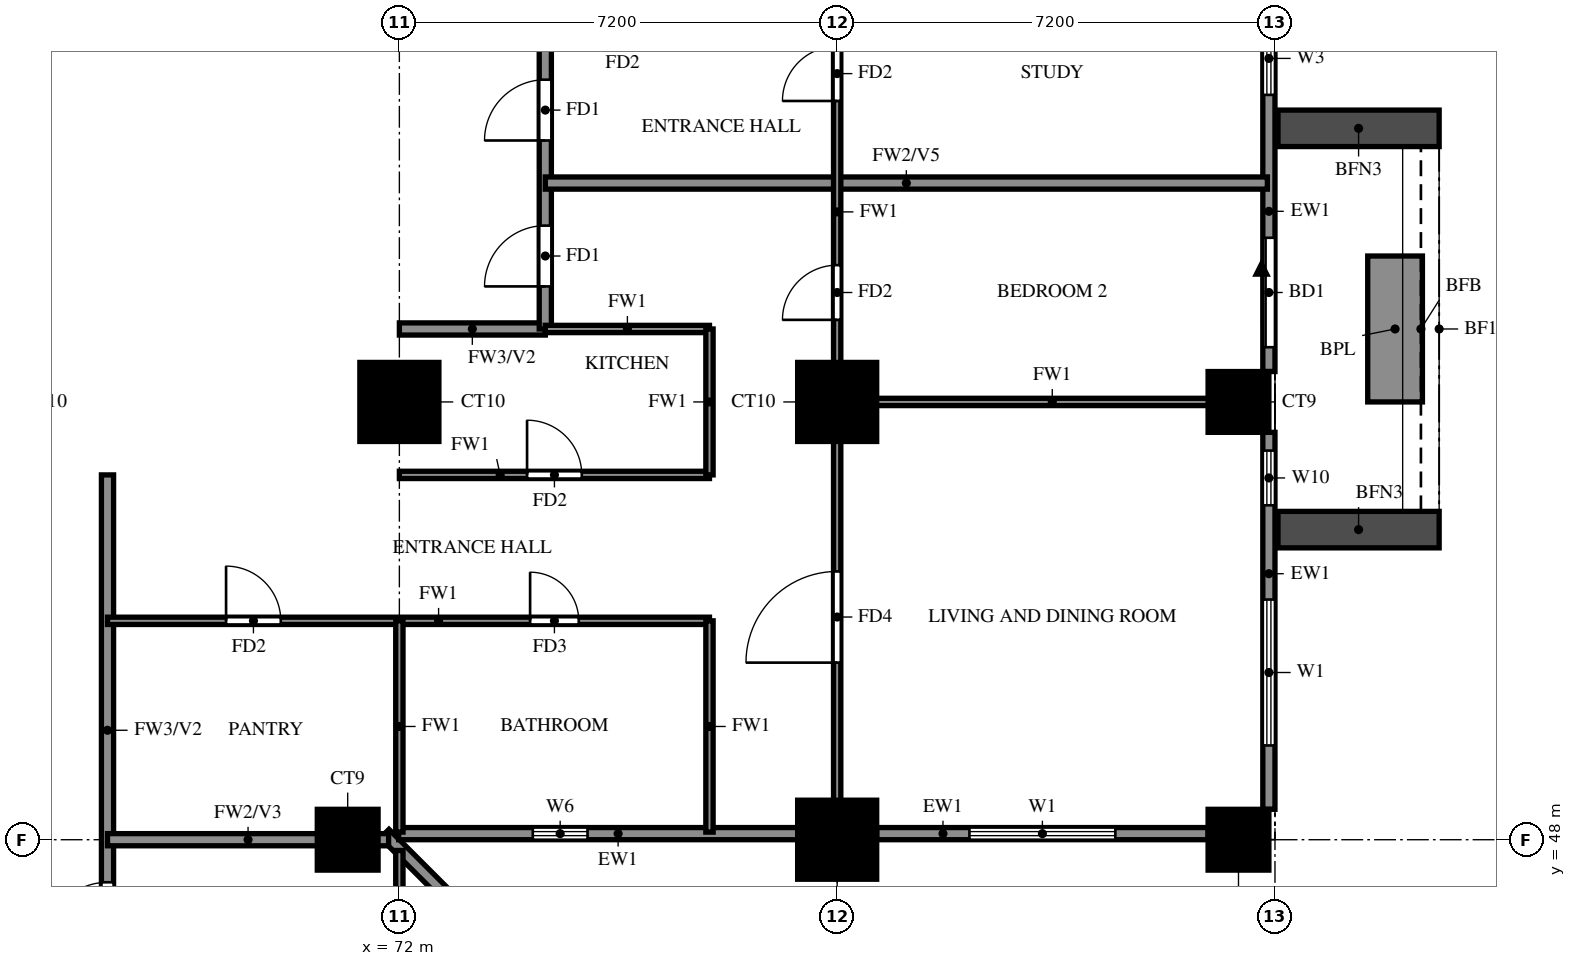
"""IFC4 building model, lengths in metres.
Left out: names, types, materials, properties, quantities, classifications, styles, units other than length and angle.
Written with IfcOpenShell. Run it as: python <this file> out.ifc"""

import sys

from ifc_helpers import new_model, si_unit, direction, frame, frame_2d, origin, origin_2d, place, context, subcontext, project, spatial, rectangle, extrude, source, transform, mapped, element, fill, save


model = new_model("IFC4")
c1 = context("Model", 3, precision=1e-05, world=origin(), true_north=direction((0.0, 1.0)))
c2 = subcontext(c1, "Body", "Model", "MODEL_VIEW")
j1 = project(units=[si_unit("LENGTHUNIT", "METRE"), si_unit("PLANEANGLEUNIT", "RADIAN")], contexts=[c1])
p1 = place(None, origin())
s1 = spatial("IfcSite", under=j1, at=p1, CompositionType="ELEMENT")
p2 = place(p1, origin())
s2 = spatial("IfcBuilding", under=s1, at=p2, CompositionType="ELEMENT")
p3 = place(p2, frame((0.0, 0.0, 90.0)))
s3 = spatial("IfcBuildingStorey", under=s2, at=p3, CompositionType="ELEMENT", Elevation=90.0)
m1 = source(origin(), c2, "Body", "SweptSolid", [
    extrude(rectangle(XDim=1.0, YDim=1.0, at=origin_2d()), origin(), (0.0, 0.0, 1.0), 3.18),
])
p4 = place(p3, frame((71.15, 48.0, 0.0), z_axis=(0.0, 0.0, 1.0), x_axis=(1.0, 0.0, 0.0)))
e1 = element("IfcColumn", 1, at=p4, inside=s3, PredefinedType="COLUMN", context=c2, shape_type="MappedRepresentation", body=[
    mapped(m1, transform((0.0, 0.0, 0.0))),
])
m2 = source(origin(), c2, "Body", "SweptSolid", [
    extrude(rectangle(XDim=1.3, YDim=1.3, at=origin_2d()), origin(), (0.0, 0.0, 1.0), 3.18),
])
p5 = place(p3, frame((79.2, 48.0, 0.0), z_axis=(0.0, 0.0, 1.0), x_axis=(1.0, 0.0, 0.0)))
e2 = element("IfcColumn", 2, at=p5, inside=s3, PredefinedType="COLUMN", context=c2, shape_type="MappedRepresentation", body=[
    mapped(m2, transform((0.0, 0.0, 0.0))),
])
p6 = place(p3, frame((85.8, 48.0, 0.0), z_axis=(0.0, 0.0, 1.0), x_axis=(1.0, 0.0, 0.0)))
e3 = element("IfcColumn", 3, at=p6, inside=s3, PredefinedType="COLUMN", context=c2, shape_type="MappedRepresentation", body=[
    mapped(m1, transform((0.0, 0.0, 0.0))),
])
for number, where, z_axis, x_axis in (
    (4, (72.0, 55.2, 0.0), (0.0, 0.0, 1.0), (1.0, 0.0, 0.0)),
    (5, (79.2, 55.2, 0.0), (0.0, 0.0, 1.0), (1.0, 0.0, 0.0)),
):
    element("IfcColumn", number, at=place(p3, frame(where, z_axis=z_axis, x_axis=x_axis)), inside=s3, PredefinedType="COLUMN", context=c2, shape_type="MappedRepresentation", body=[
        mapped(m2, transform((0.0, 0.0, 0.0))),
    ])
p7 = place(p3, frame((85.8, 55.2, 0.0), z_axis=(0.0, 0.0, 1.0), x_axis=(1.0, 0.0, 0.0)))
e6 = element("IfcColumn", 6, at=p7, inside=s3, PredefinedType="COLUMN", context=c2, shape_type="MappedRepresentation", body=[
    mapped(m1, transform((0.0, 0.0, 0.0))),
])
p8 = place(p3, frame((85.996, 33.863, 0.0), z_axis=(0.0, 0.0, 1.0), x_axis=(-0.707100718496, 0.707112843825, 0.0)))
e7 = element("IfcWall", 7, at=p8, inside=s3, PredefinedType="SOLIDWALL", context=c2, shape_type="SweptSolid", body=[
    extrude(rectangle(XDim=20.135, YDim=0.2, at=frame_2d((10.067, 0.0))), origin(), (0.0, 0.0, 1.0), 3.18),
])
p9 = place(p3, frame((71.989, 48.1, 0.0), z_axis=(0.0, 0.0, 1.0), x_axis=(1.0, 0.0, 0.0)))
e8 = element("IfcWall", 8, at=p9, inside=s3, PredefinedType="SOLIDWALL", context=c2, shape_type="SweptSolid", body=[
    extrude(rectangle(XDim=6.562, YDim=0.2, at=frame_2d((3.281, 0.0))), origin(), (0.0, 0.0, 1.0), 3.18),
])
p10 = place(p9, frame((2.206, 0.0, 1.5)))
e9 = element("IfcOpeningElement", 9, at=p10, cuts=e8, PredefinedType="OPENING", context=c2, shape_type="SweptSolid", body=[
    extrude(rectangle(XDim=0.9, YDim=0.9, at=frame_2d((0.45, 0.45))), frame((0.0, 0.11, 0.0), z_axis=(0.0, -1.0, 0.0), x_axis=(1.0, 0.0, 0.0)), (0.0, 0.0, 1.0), 0.22),
])
p11 = place(p3, frame((79.85, 48.1, 0.0), z_axis=(0.0, 0.0, 1.0), x_axis=(1.0, 0.0, 0.0)))
e10 = element("IfcWall", 10, at=p11, inside=s3, PredefinedType="SOLIDWALL", context=c2, shape_type="SweptSolid", body=[
    extrude(rectangle(XDim=5.45, YDim=0.2, at=frame_2d((2.725, 0.0))), origin(), (0.0, 0.0, 1.0), 3.18),
])
p12 = place(p11, frame((1.525, 0.0, 0.6)))
e11 = element("IfcOpeningElement", 11, at=p12, cuts=e10, PredefinedType="OPENING", context=c2, shape_type="SweptSolid", body=[
    extrude(rectangle(XDim=2.4, YDim=2.4, at=frame_2d((1.2, 1.2))), frame((0.0, 0.11, 0.0), z_axis=(0.0, -1.0, 0.0), x_axis=(1.0, 0.0, 0.0)), (0.0, 0.0, 1.0), 0.22),
])
p13 = place(p3, frame((86.3, 48.5, 0.0), z_axis=(0.0, 0.0, 1.0), x_axis=(0.0, 1.0, 0.0)))
e12 = element("IfcWall", 12, at=p13, inside=s3, PredefinedType="SOLIDWALL", context=c2, shape_type="SweptSolid", body=[
    extrude(rectangle(XDim=6.2, YDim=0.2, at=frame_2d((3.1, 0.0))), origin(), (0.0, 0.0, 1.0), 3.18),
])
p14 = place(p13, frame((1.05, 0.0, 0.6)))
e13 = element("IfcOpeningElement", 13, at=p14, cuts=e12, PredefinedType="OPENING", context=c2, shape_type="SweptSolid", body=[
    extrude(rectangle(XDim=2.4, YDim=2.4, at=frame_2d((1.2, 1.2))), frame((0.0, 0.11, 0.0), z_axis=(0.0, -1.0, 0.0), x_axis=(1.0, 0.0, 0.0)), (0.0, 0.0, 1.0), 0.22),
])
p15 = place(p13, frame((5.0, 0.0, 0.6)))
e14 = element("IfcOpeningElement", 14, at=p15, cuts=e12, PredefinedType="OPENING", context=c2, shape_type="SweptSolid", body=[
    extrude(rectangle(XDim=0.9, YDim=2.4, at=frame_2d((0.45, 1.2))), frame((0.0, 0.11, 0.0), z_axis=(0.0, -1.0, 0.0), x_axis=(1.0, 0.0, 0.0)), (0.0, 0.0, 1.0), 0.22),
])
p16 = place(p3, frame((86.3, 55.7, 0.0), z_axis=(0.0, 0.0, 1.0), x_axis=(0.0, 1.0, 0.0)))
e15 = element("IfcWall", 15, at=p16, inside=s3, PredefinedType="SOLIDWALL", context=c2, shape_type="SweptSolid", body=[
    extrude(rectangle(XDim=6.2, YDim=0.2, at=frame_2d((3.1, 0.0))), origin(), (0.0, 0.0, 1.0), 3.18),
])
p17 = place(p16, frame((0.4, 0.0, 0.0)))
e16 = element("IfcOpeningElement", 16, at=p17, cuts=e15, PredefinedType="OPENING", context=c2, shape_type="SweptSolid", body=[
    extrude(rectangle(XDim=1.8, YDim=2.4, at=frame_2d((0.9, 1.2))), frame((0.0, 0.11, 0.0), z_axis=(0.0, -1.0, 0.0), x_axis=(1.0, 0.0, 0.0)), (0.0, 0.0, 1.0), 0.22),
])
p18 = place(p16, frame((4.55, 0.0, 0.6)))
e17 = element("IfcOpeningElement", 17, at=p18, cuts=e15, PredefinedType="OPENING", context=c2, shape_type="SweptSolid", body=[
    extrude(rectangle(XDim=1.2, YDim=2.4, at=frame_2d((0.6, 1.2))), frame((0.0, 0.11, 0.0), z_axis=(0.0, -1.0, 0.0), x_axis=(1.0, 0.0, 0.0)), (0.0, 0.0, 1.0), 0.22),
])
for number, where, z_axis, x_axis in (
    (18, (86.45, 53.1, 0.0), (0.0, 0.0, 1.0), (1.0, 0.0, 0.0)),
    (19, (86.45, 59.7, 0.0), (0.0, 0.0, 1.0), (1.0, 0.0, 0.0)),
):
    element("IfcWall", number, at=place(p3, frame(where, z_axis=z_axis, x_axis=x_axis)), inside=s3, PredefinedType="SOLIDWALL", context=c2, shape_type="SweptSolid", body=[
        extrude(rectangle(XDim=2.65, YDim=0.6, at=frame_2d((1.325, 0.0))), origin(), (0.0, 0.0, 1.0), 2.85),
    ])
p19 = place(p3, frame((88.375, 55.2, 0.0), z_axis=(0.0, 0.0, 1.0), x_axis=(0.0, 1.0, 0.0)))
e20 = element("IfcWall", 20, at=p19, inside=s3, PredefinedType="SOLIDWALL", context=c2, shape_type="SweptSolid", body=[
    extrude(rectangle(XDim=2.4, YDim=0.9, at=frame_2d((1.2, 0.0))), origin(), (0.0, 0.0, 1.0), 0.9),
])
p20 = place(p3, frame((72.0, 56.4, 0.0), z_axis=(0.0, 0.0, 1.0), x_axis=(1.0, 0.0, 0.0)))
e21 = element("IfcWall", 21, at=p20, inside=s3, PredefinedType="SOLIDWALL", context=c2, shape_type="SweptSolid", body=[
    extrude(rectangle(XDim=2.4, YDim=0.2, at=frame_2d((1.2, 0.0))), origin(), (0.0, 0.0, 1.0), 3.18),
])
p21 = place(p3, frame((67.2, 45.6, 0.0), z_axis=(0.0, 0.0, 1.0), x_axis=(0.0, 1.0, 0.0)))
e22 = element("IfcWall", 22, at=p21, inside=s3, PredefinedType="SOLIDWALL", context=c2, shape_type="SweptSolid", body=[
    extrude(rectangle(XDim=8.4, YDim=0.2, at=frame_2d((4.2, 0.0))), origin(), (0.0, 0.0, 1.0), 3.18),
])
p22 = place(p21, frame((0.7, 0.0, 0.0)))
e23 = element("IfcOpeningElement", 23, at=p22, cuts=e22, PredefinedType="OPENING", context=c2, shape_type="SweptSolid", body=[
    extrude(rectangle(XDim=1.0, YDim=2.1, at=frame_2d((0.5, 1.05))), frame((0.0, 0.11, 0.0), z_axis=(0.0, -1.0, 0.0), x_axis=(1.0, 0.0, 0.0)), (0.0, 0.0, 1.0), 0.22),
])
p23 = place(p3, frame((74.4, 56.4, 0.0), z_axis=(0.0, 0.0, 1.0), x_axis=(0.0, 1.0, 0.0)))
e24 = element("IfcWall", 24, at=p23, inside=s3, PredefinedType="SOLIDWALL", context=c2, shape_type="SweptSolid", body=[
    extrude(rectangle(XDim=9.6, YDim=0.2, at=frame_2d((4.8, 0.0))), origin(), (0.0, 0.0, 1.0), 3.18),
])
p24 = place(p23, frame((0.7, 0.0, 0.0)))
e25 = element("IfcOpeningElement", 25, at=p24, cuts=e24, PredefinedType="OPENING", context=c2, shape_type="SweptSolid", body=[
    extrude(rectangle(XDim=1.0, YDim=2.1, at=frame_2d((0.5, 1.05))), frame((0.0, 0.11, 0.0), z_axis=(0.0, -1.0, 0.0), x_axis=(1.0, 0.0, 0.0)), (0.0, 0.0, 1.0), 0.22),
])
p25 = place(p23, frame((3.1, 0.0, 0.0)))
e26 = element("IfcOpeningElement", 26, at=p25, cuts=e24, PredefinedType="OPENING", context=c2, shape_type="SweptSolid", body=[
    extrude(rectangle(XDim=1.0, YDim=2.1, at=frame_2d((0.5, 1.05))), frame((0.0, 0.11, 0.0), z_axis=(0.0, -1.0, 0.0), x_axis=(1.0, 0.0, 0.0)), (0.0, 0.0, 1.0), 0.22),
])
p26 = place(p3, frame((67.2, 48.0, 0.0), z_axis=(0.0, 0.0, 1.0), x_axis=(1.0, 0.0, 0.0)))
e27 = element("IfcWall", 27, at=p26, inside=s3, PredefinedType="SOLIDWALL", context=c2, shape_type="SweptSolid", body=[
    extrude(rectangle(XDim=4.623, YDim=0.2, at=frame_2d((2.312, 0.0))), origin(), (0.0, 0.0, 1.0), 3.18),
])
p27 = place(p3, frame((74.4, 58.8, 0.0), z_axis=(0.0, 0.0, 1.0), x_axis=(1.0, 0.0, 0.0)))
e28 = element("IfcWall", 28, at=p27, inside=s3, PredefinedType="SOLIDWALL", context=c2, shape_type="SweptSolid", body=[
    extrude(rectangle(XDim=11.875, YDim=0.2, at=frame_2d((5.938, 0.0))), origin(), (0.0, 0.0, 1.0), 2.28),
])
p28 = place(p3, frame((67.2, 51.6, 0.0), z_axis=(0.0, 0.0, 1.0), x_axis=(1.0, 0.0, 0.0)))
e29 = element("IfcWall", 29, at=p28, inside=s3, PredefinedType="PARTITIONING", context=c2, shape_type="SweptSolid", body=[
    extrude(rectangle(XDim=9.9, YDim=0.12, at=frame_2d((4.95, 0.0))), origin(), (0.0, 0.0, 1.0), 3.18),
])
p29 = place(p28, frame((6.95, 0.0, 0.0)))
e30 = element("IfcOpeningElement", 30, at=p29, cuts=e29, PredefinedType="OPENING", context=c2, shape_type="SweptSolid", body=[
    extrude(rectangle(XDim=0.8, YDim=2.1, at=frame_2d((0.4, 1.05))), frame((0.0, 0.07, 0.0), z_axis=(0.0, -1.0, 0.0), x_axis=(1.0, 0.0, 0.0)), (0.0, 0.0, 1.0), 0.14),
])
p30 = place(p28, frame((1.95, 0.0, 0.0)))
e31 = element("IfcOpeningElement", 31, at=p30, cuts=e29, PredefinedType="OPENING", context=c2, shape_type="SweptSolid", body=[
    extrude(rectangle(XDim=0.9, YDim=2.1, at=frame_2d((0.45, 1.05))), frame((0.0, 0.07, 0.0), z_axis=(0.0, -1.0, 0.0), x_axis=(1.0, 0.0, 0.0)), (0.0, 0.0, 1.0), 0.14),
])
p31 = place(p3, frame((72.0, 54.0, 0.0), z_axis=(0.0, 0.0, 1.0), x_axis=(1.0, 0.0, 0.0)))
e32 = element("IfcWall", 32, at=p31, inside=s3, PredefinedType="PARTITIONING", context=c2, shape_type="SweptSolid", body=[
    extrude(rectangle(XDim=5.1, YDim=0.12, at=frame_2d((2.55, 0.0))), origin(), (0.0, 0.0, 1.0), 3.18),
])
p32 = place(p31, frame((2.1, 0.0, 0.0)))
e33 = element("IfcOpeningElement", 33, at=p32, cuts=e32, PredefinedType="OPENING", context=c2, shape_type="SweptSolid", body=[
    extrude(rectangle(XDim=0.9, YDim=2.1, at=frame_2d((0.45, 1.05))), frame((0.0, 0.07, 0.0), z_axis=(0.0, -1.0, 0.0), x_axis=(1.0, 0.0, 0.0)), (0.0, 0.0, 1.0), 0.14),
])
p33 = place(p3, frame((79.2, 55.2, 0.0), z_axis=(0.0, 0.0, 1.0), x_axis=(1.0, 0.0, 0.0)))
e34 = element("IfcWall", 34, at=p33, inside=s3, PredefinedType="PARTITIONING", context=c2, shape_type="SweptSolid", body=[
    extrude(rectangle(XDim=7.075, YDim=0.12, at=frame_2d((3.538, 0.0))), origin(), (0.0, 0.0, 1.0), 3.18),
])
p34 = place(p3, frame((74.4, 56.4, 0.0), z_axis=(0.0, 0.0, 1.0), x_axis=(1.0, 0.0, 0.0)))
e35 = element("IfcWall", 35, at=p34, inside=s3, PredefinedType="PARTITIONING", context=c2, shape_type="SweptSolid", body=[
    extrude(rectangle(XDim=2.7, YDim=0.12, at=frame_2d((1.35, 0.0))), origin(), (0.0, 0.0, 1.0), 3.18),
])
p35 = place(p3, frame((72.0, 33.725, 0.0), z_axis=(0.0, 0.0, 1.0), x_axis=(0.0, 1.0, 0.0)))
e36 = element("IfcWall", 36, at=p35, inside=s3, PredefinedType="PARTITIONING", context=c2, shape_type="SweptSolid", body=[
    extrude(rectangle(XDim=14.098, YDim=0.12, at=frame_2d((7.049, 0.0))), origin(), (0.0, 0.0, 1.0), 2.28),
])
p36 = place(p35, frame((10.075, 0.0, 0.0)))
e37 = element("IfcOpeningElement", 37, at=p36, cuts=e36, PredefinedType="OPENING", context=c2, shape_type="SweptSolid", body=[
    extrude(rectangle(XDim=0.9, YDim=2.1, at=frame_2d((0.45, 1.05))), frame((0.0, 0.07, 0.0), z_axis=(0.0, -1.0, 0.0), x_axis=(1.0, 0.0, 0.0)), (0.0, 0.0, 1.0), 0.14),
])
for number, where, z_axis, x_axis in (
    (38, (72.0, 48.125, 0.0), (0.0, 0.0, 1.0), (0.0, 1.0, 0.0)),
    (39, (77.1, 48.125, 0.0), (0.0, 0.0, 1.0), (0.0, 1.0, 0.0)),
):
    element("IfcWall", number, at=place(p3, frame(where, z_axis=z_axis, x_axis=x_axis)), inside=s3, PredefinedType="PARTITIONING", context=c2, shape_type="SweptSolid", body=[
        extrude(rectangle(XDim=3.475, YDim=0.12, at=frame_2d((1.738, 0.0))), origin(), (0.0, 0.0, 1.0), 3.18),
    ])
p37 = place(p3, frame((77.1, 54.0, 0.0), z_axis=(0.0, 0.0, 1.0), x_axis=(0.0, 1.0, 0.0)))
e40 = element("IfcWall", 40, at=p37, inside=s3, PredefinedType="PARTITIONING", context=c2, shape_type="SweptSolid", body=[
    extrude(rectangle(XDim=2.4, YDim=0.12, at=frame_2d((1.2, 0.0))), origin(), (0.0, 0.0, 1.0), 3.18),
])
p38 = place(p3, frame((79.2, 48.125, 0.0), z_axis=(0.0, 0.0, 1.0), x_axis=(0.0, 1.0, 0.0)))
e41 = element("IfcWall", 41, at=p38, inside=s3, PredefinedType="PARTITIONING", context=c2, shape_type="SweptSolid", body=[
    extrude(rectangle(XDim=21.475, YDim=0.12, at=frame_2d((10.738, 0.0))), origin(), (0.0, 0.0, 1.0), 3.18),
])
p39 = place(p38, frame((2.788, 0.0, 0.0)))
e42 = element("IfcOpeningElement", 42, at=p39, cuts=e41, PredefinedType="OPENING", context=c2, shape_type="SweptSolid", body=[
    extrude(rectangle(XDim=1.5, YDim=2.1, at=frame_2d((0.75, 1.05))), frame((0.0, 0.07, 0.0), z_axis=(0.0, -1.0, 0.0), x_axis=(1.0, 0.0, 0.0)), (0.0, 0.0, 1.0), 0.14),
])
p40 = place(p38, frame((8.425, 0.0, 0.0)))
e43 = element("IfcOpeningElement", 43, at=p40, cuts=e41, PredefinedType="OPENING", context=c2, shape_type="SweptSolid", body=[
    extrude(rectangle(XDim=0.9, YDim=2.1, at=frame_2d((0.45, 1.05))), frame((0.0, 0.07, 0.0), z_axis=(0.0, -1.0, 0.0), x_axis=(1.0, 0.0, 0.0)), (0.0, 0.0, 1.0), 0.14),
])
p41 = place(p38, frame((12.025, 0.0, 0.0)))
e44 = element("IfcOpeningElement", 44, at=p41, cuts=e41, PredefinedType="OPENING", context=c2, shape_type="SweptSolid", body=[
    extrude(rectangle(XDim=0.9, YDim=2.1, at=frame_2d((0.45, 1.05))), frame((0.0, 0.07, 0.0), z_axis=(0.0, -1.0, 0.0), x_axis=(1.0, 0.0, 0.0)), (0.0, 0.0, 1.0), 0.14),
])
p42 = place(p38, frame((17.425, 0.0, 0.0)))
e45 = element("IfcOpeningElement", 45, at=p42, cuts=e41, PredefinedType="OPENING", context=c2, shape_type="SweptSolid", body=[
    extrude(rectangle(XDim=0.9, YDim=2.1, at=frame_2d((0.45, 1.05))), frame((0.0, 0.07, 0.0), z_axis=(0.0, -1.0, 0.0), x_axis=(1.0, 0.0, 0.0)), (0.0, 0.0, 1.0), 0.14),
])
p43 = place(p10, origin())
e46 = element("IfcWindow", 46, at=p43, inside=s3, PartitioningType="SINGLE_PANEL", PredefinedType="WINDOW", context=c2, shape_type="SweptSolid", body=[
    extrude(rectangle(XDim=0.9, YDim=0.9, at=frame_2d((0.45, 0.45))), frame((0.0, 0.03, 0.0), z_axis=(0.0, -1.0, 0.0), x_axis=(1.0, 0.0, 0.0)), (0.0, 0.0, 1.0), 0.06),
])
fill(e9, e46)
p44 = place(p12, origin())
e47 = element("IfcWindow", 47, at=p44, inside=s3, PartitioningType="DOUBLE_PANEL_VERTICAL", PredefinedType="WINDOW", context=c2, shape_type="SweptSolid", body=[
    extrude(rectangle(XDim=2.4, YDim=2.4, at=frame_2d((1.2, 1.2))), frame((0.0, 0.03, 0.0), z_axis=(0.0, -1.0, 0.0), x_axis=(1.0, 0.0, 0.0)), (0.0, 0.0, 1.0), 0.06),
])
fill(e11, e47)
p45 = place(p14, origin())
e48 = element("IfcWindow", 48, at=p45, inside=s3, PartitioningType="DOUBLE_PANEL_VERTICAL", PredefinedType="WINDOW", context=c2, shape_type="SweptSolid", body=[
    extrude(rectangle(XDim=2.4, YDim=2.4, at=frame_2d((1.2, 1.2))), frame((0.0, 0.03, 0.0), z_axis=(0.0, -1.0, 0.0), x_axis=(1.0, 0.0, 0.0)), (0.0, 0.0, 1.0), 0.06),
])
fill(e13, e48)
p46 = place(p15, origin())
e49 = element("IfcWindow", 49, at=p46, inside=s3, PartitioningType="SINGLE_PANEL", PredefinedType="WINDOW", context=c2, shape_type="SweptSolid", body=[
    extrude(rectangle(XDim=0.9, YDim=2.4, at=frame_2d((0.45, 1.2))), frame((0.0, 0.03, 0.0), z_axis=(0.0, -1.0, 0.0), x_axis=(1.0, 0.0, 0.0)), (0.0, 0.0, 1.0), 0.06),
])
fill(e14, e49)
p47 = place(p17, origin())
e50 = element("IfcDoor", 50, at=p47, inside=s3, OperationType="DOUBLE_DOOR_SLIDING", PredefinedType="DOOR", context=c2, shape_type="SweptSolid", body=[
    extrude(rectangle(XDim=1.8, YDim=2.4, at=frame_2d((0.9, 1.2))), frame((0.0, 0.025, 0.0), z_axis=(0.0, -1.0, 0.0), x_axis=(1.0, 0.0, 0.0)), (0.0, 0.0, 1.0), 0.05),
])
fill(e16, e50)
p48 = place(p18, origin())
e51 = element("IfcWindow", 51, at=p48, inside=s3, PartitioningType="SINGLE_PANEL", PredefinedType="WINDOW", context=c2, shape_type="SweptSolid", body=[
    extrude(rectangle(XDim=1.2, YDim=2.4, at=frame_2d((0.6, 1.2))), frame((0.0, 0.03, 0.0), z_axis=(0.0, -1.0, 0.0), x_axis=(1.0, 0.0, 0.0)), (0.0, 0.0, 1.0), 0.06),
])
fill(e17, e51)
p49 = place(p24, origin())
e52 = element("IfcDoor", 52, at=p49, inside=s3, OperationType="SINGLE_SWING_LEFT", PredefinedType="DOOR", context=c2, shape_type="SweptSolid", body=[
    extrude(rectangle(XDim=1.0, YDim=2.1, at=frame_2d((0.5, 1.05))), frame((0.0, 0.025, 0.0), z_axis=(0.0, -1.0, 0.0), x_axis=(1.0, 0.0, 0.0)), (0.0, 0.0, 1.0), 0.05),
])
fill(e25, e52)
p50 = place(p39, origin())
e53 = element("IfcDoor", 53, at=p50, inside=s3, OperationType="SINGLE_SWING_LEFT", PredefinedType="DOOR", context=c2, shape_type="SweptSolid", body=[
    extrude(rectangle(XDim=1.5, YDim=2.1, at=frame_2d((0.75, 1.05))), frame((0.0, 0.025, 0.0), z_axis=(0.0, -1.0, 0.0), x_axis=(1.0, 0.0, 0.0)), (0.0, 0.0, 1.0), 0.05),
])
fill(e42, e53)
p51 = place(p40, origin())
e54 = element("IfcDoor", 54, at=p51, inside=s3, OperationType="SINGLE_SWING_RIGHT", PredefinedType="DOOR", context=c2, shape_type="SweptSolid", body=[
    extrude(rectangle(XDim=0.9, YDim=2.1, at=frame_2d((0.45, 1.05))), frame((0.0, 0.025, 0.0), z_axis=(0.0, -1.0, 0.0), x_axis=(1.0, 0.0, 0.0)), (0.0, 0.0, 1.0), 0.05),
])
fill(e43, e54)
p52 = place(p29, origin())
e55 = element("IfcDoor", 55, at=p52, inside=s3, OperationType="SINGLE_SWING_LEFT", PredefinedType="DOOR", context=c2, shape_type="SweptSolid", body=[
    extrude(rectangle(XDim=0.8, YDim=2.1, at=frame_2d((0.4, 1.05))), frame((0.0, 0.025, 0.0), z_axis=(0.0, -1.0, 0.0), x_axis=(1.0, 0.0, 0.0)), (0.0, 0.0, 1.0), 0.05),
])
fill(e30, e55)
p53 = place(p32, origin())
e56 = element("IfcDoor", 56, at=p53, inside=s3, OperationType="SINGLE_SWING_LEFT", PredefinedType="DOOR", context=c2, shape_type="SweptSolid", body=[
    extrude(rectangle(XDim=0.9, YDim=2.1, at=frame_2d((0.45, 1.05))), frame((0.0, 0.025, 0.0), z_axis=(0.0, -1.0, 0.0), x_axis=(1.0, 0.0, 0.0)), (0.0, 0.0, 1.0), 0.05),
])
fill(e33, e56)
p54 = place(p30, origin())
e57 = element("IfcDoor", 57, at=p54, inside=s3, OperationType="SINGLE_SWING_RIGHT", PredefinedType="DOOR", context=c2, shape_type="SweptSolid", body=[
    extrude(rectangle(XDim=0.9, YDim=2.1, at=frame_2d((0.45, 1.05))), frame((0.0, 0.025, 0.0), z_axis=(0.0, -1.0, 0.0), x_axis=(1.0, 0.0, 0.0)), (0.0, 0.0, 1.0), 0.05),
])
fill(e31, e57)
p55 = place(p25, origin())
e58 = element("IfcDoor", 58, at=p55, inside=s3, OperationType="SINGLE_SWING_LEFT", PredefinedType="DOOR", context=c2, shape_type="SweptSolid", body=[
    extrude(rectangle(XDim=1.0, YDim=2.1, at=frame_2d((0.5, 1.05))), frame((0.0, 0.025, 0.0), z_axis=(0.0, -1.0, 0.0), x_axis=(1.0, 0.0, 0.0)), (0.0, 0.0, 1.0), 0.05),
])
fill(e26, e58)
p56 = place(p41, origin())
e59 = element("IfcDoor", 59, at=p56, inside=s3, OperationType="SINGLE_SWING_RIGHT", PredefinedType="DOOR", context=c2, shape_type="SweptSolid", body=[
    extrude(rectangle(XDim=0.9, YDim=2.1, at=frame_2d((0.45, 1.05))), frame((0.0, 0.025, 0.0), z_axis=(0.0, -1.0, 0.0), x_axis=(1.0, 0.0, 0.0)), (0.0, 0.0, 1.0), 0.05),
])
fill(e44, e59)
p57 = place(p22, origin())
e60 = element("IfcDoor", 60, at=p57, inside=s3, OperationType="SINGLE_SWING_LEFT", PredefinedType="DOOR", context=c2, shape_type="SweptSolid", body=[
    extrude(rectangle(XDim=1.0, YDim=2.1, at=frame_2d((0.5, 1.05))), frame((0.0, 0.025, 0.0), z_axis=(0.0, -1.0, 0.0), x_axis=(1.0, 0.0, 0.0)), (0.0, 0.0, 1.0), 0.05),
])
fill(e23, e60)
save(model, sys.argv[1])
